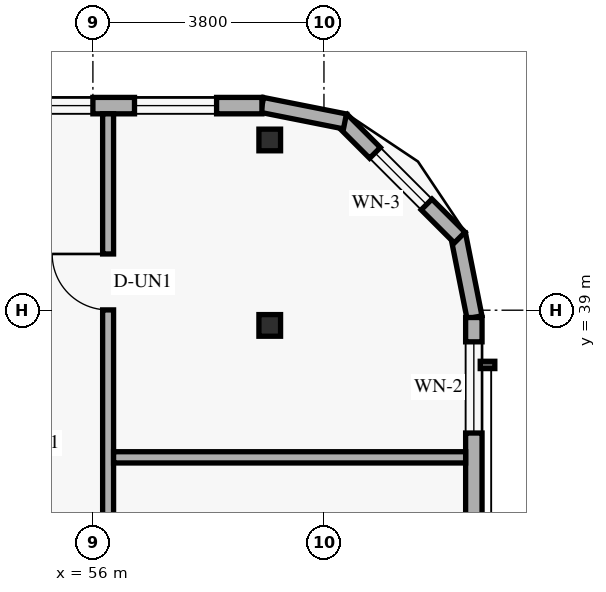
"""IFC4 building model, lengths in metres.
Left out: names, types, materials, properties, quantities, classifications, styles, units other than length and angle.
Written with IfcOpenShell. Run it as: python <this file> out.ifc"""

import sys

from ifc_helpers import new_model, si_unit, direction, frame, frame_2d, origin, origin_2d, place, context, subcontext, project, spatial, rectangle, hollow_rectangle, extrude, element, fill, save


model = new_model("IFC4")
c1 = context("Model", 3, precision=1e-05, world=origin(), true_north=direction((0.0, 1.0)))
c2 = subcontext(c1, "Body", "Model", "MODEL_VIEW")
j1 = project(units=[si_unit("LENGTHUNIT", "METRE"), si_unit("PLANEANGLEUNIT", "RADIAN")], contexts=[c1])
p1 = place(None, origin())
s1 = spatial("IfcSite", under=j1, at=p1, CompositionType="ELEMENT")
p2 = place(p1, origin())
s2 = spatial("IfcBuilding", under=s1, at=p2, CompositionType="ELEMENT")
p3 = place(p2, frame((0.0, 0.0, 278.4)))
s3 = spatial("IfcBuildingStorey", under=s2, at=p3, CompositionType="ELEMENT", Elevation=278.4)
for number, where, z_axis, x_axis in (
    (1, (58.804, 38.75, 0.0), (0.058, 0.0, 0.998), (0.0, 1.0, 0.0)),
    (2, (58.804, 41.8, 0.0), (0.058, 0.0, 0.998), (0.0, 1.0, 0.0)),
):
    element("IfcColumn", number, at=place(p3, frame(where, z_axis=z_axis, x_axis=x_axis)), inside=s3, PredefinedType="COLUMN", context=c2, shape_type="SweptSolid", body=[
        extrude(hollow_rectangle(XDim=0.356, YDim=0.356, WallThickness=0.016, at=origin_2d()), origin(), (0.0, 0.0, 1.0), 3.606),
    ])
p4 = place(p3, frame((62.276, 38.884, 0.0), z_axis=(0.0, 0.0, 1.0), x_axis=(-0.195135625965, 0.9807762678, 0.0)))
e3 = element("IfcWall", 3, at=p4, inside=s3, PredefinedType="SOLIDWALL", context=c2, shape_type="SweptSolid", body=[
    extrude(rectangle(XDim=1.389, YDim=0.25, at=frame_2d((0.694, 0.0))), origin(), (0.0, 0.0, 1.0), 3.3),
])
p5 = place(p3, frame((62.032, 40.195, 0.0), z_axis=(0.0, 0.0, 1.0), x_axis=(-0.707106781187, 0.707106781187, 0.0)))
e4 = element("IfcWall", 4, at=p5, inside=s3, PredefinedType="SOLIDWALL", context=c2, shape_type="SweptSolid", body=[
    extrude(rectangle(XDim=2.739, YDim=0.25, at=frame_2d((1.37, 0.0))), origin(), (0.0, 0.0, 1.0), 3.3),
])
p6 = place(p5, frame((0.77, 0.0, 0.85)))
e5 = element("IfcOpeningElement", 5, at=p6, cuts=e4, PredefinedType="OPENING", context=c2, shape_type="SweptSolid", body=[
    extrude(rectangle(XDim=1.2, YDim=1.5, at=frame_2d((0.6, 0.75))), frame((0.0, 0.135, 0.0), z_axis=(0.0, -1.0, 0.0), x_axis=(1.0, 0.0, 0.0)), (0.0, 0.0, 1.0), 0.27),
])
p7 = place(p3, frame((60.146, 42.105, 0.0), z_axis=(0.0, 0.0, 1.0), x_axis=(-0.980809899341, 0.19496651342, 0.0)))
e6 = element("IfcWall", 6, at=p7, inside=s3, PredefinedType="SOLIDWALL", context=c2, shape_type="SweptSolid", body=[
    extrude(rectangle(XDim=1.389, YDim=0.25, at=frame_2d((0.694, 0.0))), origin(), (0.0, 0.0, 1.0), 3.3),
])
p8 = place(p3, frame((62.265, 29.4, 0.0), z_axis=(0.0, 0.0, 1.0), x_axis=(0.0, 1.0, 0.0)))
e7 = element("IfcWall", 7, at=p8, inside=s3, PredefinedType="SOLIDWALL", context=c2, shape_type="SweptSolid", body=[
    extrude(rectangle(XDim=9.48, YDim=0.27, at=frame_2d((4.74, 0.0))), origin(), (0.0, 0.0, 1.0), 3.3),
])
p9 = place(p8, frame((3.47, 0.0, 0.85)))
e8 = element("IfcOpeningElement", 8, at=p9, cuts=e7, PredefinedType="OPENING", context=c2, shape_type="SweptSolid", body=[
    extrude(rectangle(XDim=1.5, YDim=1.55, at=frame_2d((0.75, 0.775))), frame((0.0, 0.145, 0.0), z_axis=(0.0, -1.0, 0.0), x_axis=(1.0, 0.0, 0.0)), (0.0, 0.0, 1.0), 0.29),
])
p10 = place(p8, frame((7.58, 0.0, 0.85)))
e9 = element("IfcOpeningElement", 9, at=p10, cuts=e7, PredefinedType="OPENING", context=c2, shape_type="SweptSolid", body=[
    extrude(rectangle(XDim=1.5, YDim=1.55, at=frame_2d((0.75, 0.775))), frame((0.0, 0.145, 0.0), z_axis=(0.0, -1.0, 0.0), x_axis=(1.0, 0.0, 0.0)), (0.0, 0.0, 1.0), 0.29),
])
p11 = place(p3, frame((58.78, 42.365, 0.0), z_axis=(0.0, 0.0, 1.0), x_axis=(-1.0, 0.0, 0.0)))
e10 = element("IfcWall", 10, at=p11, inside=s3, PredefinedType="SOLIDWALL", context=c2, shape_type="SweptSolid", body=[
    extrude(rectangle(XDim=32.96, YDim=0.27, at=frame_2d((16.48, 0.0))), origin(), (0.0, 0.0, 1.0), 3.3),
])
p12 = place(p11, frame((17.06, 0.0, 0.85)))
e11 = element("IfcOpeningElement", 11, at=p12, cuts=e10, PredefinedType="OPENING", context=c2, shape_type="SweptSolid", body=[
    extrude(rectangle(XDim=1.35, YDim=1.55, at=frame_2d((0.675, 0.775))), frame((0.0, 0.145, 0.0), z_axis=(0.0, -1.0, 0.0), x_axis=(1.0, 0.0, 0.0)), (0.0, 0.0, 1.0), 0.29),
])
p13 = place(p11, frame((5.813, 0.0, 0.85)))
e12 = element("IfcOpeningElement", 12, at=p13, cuts=e10, PredefinedType="OPENING", context=c2, shape_type="SweptSolid", body=[
    extrude(rectangle(XDim=1.35, YDim=1.55, at=frame_2d((0.675, 0.775))), frame((0.0, 0.145, 0.0), z_axis=(0.0, -1.0, 0.0), x_axis=(1.0, 0.0, 0.0)), (0.0, 0.0, 1.0), 0.29),
])
p14 = place(p11, frame((2.78, 0.0, 0.85)))
e13 = element("IfcOpeningElement", 13, at=p14, cuts=e10, PredefinedType="OPENING", context=c2, shape_type="SweptSolid", body=[
    extrude(rectangle(XDim=1.35, YDim=1.55, at=frame_2d((0.675, 0.775))), frame((0.0, 0.145, 0.0), z_axis=(0.0, -1.0, 0.0), x_axis=(1.0, 0.0, 0.0)), (0.0, 0.0, 1.0), 0.29),
])
p15 = place(p11, frame((0.746, 0.0, 0.85)))
e14 = element("IfcOpeningElement", 14, at=p15, cuts=e10, PredefinedType="OPENING", context=c2, shape_type="SweptSolid", body=[
    extrude(rectangle(XDim=1.35, YDim=1.55, at=frame_2d((0.675, 0.775))), frame((0.0, 0.145, 0.0), z_axis=(0.0, -1.0, 0.0), x_axis=(1.0, 0.0, 0.0)), (0.0, 0.0, 1.0), 0.29),
])
p16 = place(p3, frame((56.25, 5.77, 0.0), z_axis=(0.0, 0.0, 1.0), x_axis=(0.0, 1.0, 0.0)))
e15 = element("IfcWall", 15, at=p16, inside=s3, PredefinedType="STANDARD", context=c2, shape_type="SweptSolid", body=[
    extrude(rectangle(XDim=36.46, YDim=0.18, at=frame_2d((18.23, 0.0))), origin(), (0.0, 0.0, 1.0), 2.743),
])
p17 = place(p16, frame((1.93, 0.0, 0.0)))
e16 = element("IfcOpeningElement", 16, at=p17, cuts=e15, PredefinedType="OPENING", context=c2, shape_type="SweptSolid", body=[
    extrude(rectangle(XDim=0.92, YDim=2.15, at=frame_2d((0.46, 1.075))), frame((0.0, 0.1, 0.0), z_axis=(0.0, -1.0, 0.0), x_axis=(1.0, 0.0, 0.0)), (0.0, 0.0, 1.0), 0.2),
])
p18 = place(p16, frame((12.87, 0.0, 0.0)))
e17 = element("IfcOpeningElement", 17, at=p18, cuts=e15, PredefinedType="OPENING", context=c2, shape_type="SweptSolid", body=[
    extrude(rectangle(XDim=0.92, YDim=2.15, at=frame_2d((0.46, 1.075))), frame((0.0, 0.1, 0.0), z_axis=(0.0, -1.0, 0.0), x_axis=(1.0, 0.0, 0.0)), (0.0, 0.0, 1.0), 0.2),
])
p19 = place(p16, frame((21.38, 0.0, 0.0)))
e18 = element("IfcOpeningElement", 18, at=p19, cuts=e15, PredefinedType="OPENING", context=c2, shape_type="SweptSolid", body=[
    extrude(rectangle(XDim=0.92, YDim=2.15, at=frame_2d((0.46, 1.075))), frame((0.0, 0.1, 0.0), z_axis=(0.0, -1.0, 0.0), x_axis=(1.0, 0.0, 0.0)), (0.0, 0.0, 1.0), 0.2),
])
p20 = place(p16, frame((27.39, 0.0, 0.0)))
e19 = element("IfcOpeningElement", 19, at=p20, cuts=e15, PredefinedType="OPENING", context=c2, shape_type="SweptSolid", body=[
    extrude(rectangle(XDim=0.92, YDim=2.15, at=frame_2d((0.46, 1.075))), frame((0.0, 0.1, 0.0), z_axis=(0.0, -1.0, 0.0), x_axis=(1.0, 0.0, 0.0)), (0.0, 0.0, 1.0), 0.2),
])
p21 = place(p16, frame((33.235, 0.0, 0.0)))
e20 = element("IfcOpeningElement", 20, at=p21, cuts=e15, PredefinedType="OPENING", context=c2, shape_type="SweptSolid", body=[
    extrude(rectangle(XDim=0.92, YDim=2.15, at=frame_2d((0.46, 1.075))), frame((0.0, 0.1, 0.0), z_axis=(0.0, -1.0, 0.0), x_axis=(1.0, 0.0, 0.0)), (0.0, 0.0, 1.0), 0.2),
])
p22 = place(p3, frame((56.34, 36.58, 0.0), z_axis=(0.0, 0.0, 1.0), x_axis=(1.0, 0.0, 0.0)))
e21 = element("IfcWall", 21, at=p22, inside=s3, PredefinedType="PARTITIONING", context=c2, shape_type="SweptSolid", body=[
    extrude(rectangle(XDim=5.79, YDim=0.185, at=frame_2d((2.895, 0.0))), origin(), (0.0, 0.0, 1.0), 2.743),
])
p23 = place(p6, origin())
e22 = element("IfcWindow", 22, at=p23, inside=s3, PartitioningType="SINGLE_PANEL", PredefinedType="WINDOW", context=c2, shape_type="SweptSolid", body=[
    extrude(rectangle(XDim=1.2, YDim=1.5, at=frame_2d((0.6, 0.75))), frame((0.0, 0.03, 0.0), z_axis=(0.0, -1.0, 0.0), x_axis=(1.0, 0.0, 0.0)), (0.0, 0.0, 1.0), 0.06),
])
fill(e5, e22)
p24 = place(p10, origin())
e23 = element("IfcWindow", 23, at=p24, inside=s3, PartitioningType="SINGLE_PANEL", PredefinedType="WINDOW", context=c2, shape_type="SweptSolid", body=[
    extrude(rectangle(XDim=1.5, YDim=1.55, at=frame_2d((0.75, 0.775))), frame((0.0, 0.03, 0.0), z_axis=(0.0, -1.0, 0.0), x_axis=(1.0, 0.0, 0.0)), (0.0, 0.0, 1.0), 0.06),
])
fill(e9, e23)
p25 = place(p14, origin())
e24 = element("IfcWindow", 24, at=p25, inside=s3, PartitioningType="SINGLE_PANEL", PredefinedType="WINDOW", context=c2, shape_type="SweptSolid", body=[
    extrude(rectangle(XDim=1.35, YDim=1.55, at=frame_2d((0.675, 0.775))), frame((0.0, 0.03, 0.0), z_axis=(0.0, -1.0, 0.0), x_axis=(1.0, 0.0, 0.0)), (0.0, 0.0, 1.0), 0.06),
])
fill(e13, e24)
p26 = place(p15, origin())
e25 = element("IfcWindow", 25, at=p26, inside=s3, PartitioningType="SINGLE_PANEL", PredefinedType="WINDOW", context=c2, shape_type="SweptSolid", body=[
    extrude(rectangle(XDim=1.35, YDim=1.55, at=frame_2d((0.675, 0.775))), frame((0.0, 0.03, 0.0), z_axis=(0.0, -1.0, 0.0), x_axis=(1.0, 0.0, 0.0)), (0.0, 0.0, 1.0), 0.06),
])
fill(e14, e25)
p27 = place(p21, origin())
e26 = element("IfcDoor", 26, at=p27, inside=s3, OperationType="SINGLE_SWING_RIGHT", PredefinedType="DOOR", context=c2, shape_type="SweptSolid", body=[
    extrude(rectangle(XDim=0.92, YDim=2.15, at=frame_2d((0.46, 1.075))), frame((0.0, 0.025, 0.0), z_axis=(0.0, -1.0, 0.0), x_axis=(1.0, 0.0, 0.0)), (0.0, 0.0, 1.0), 0.05),
])
fill(e20, e26)
save(model, sys.argv[1])
